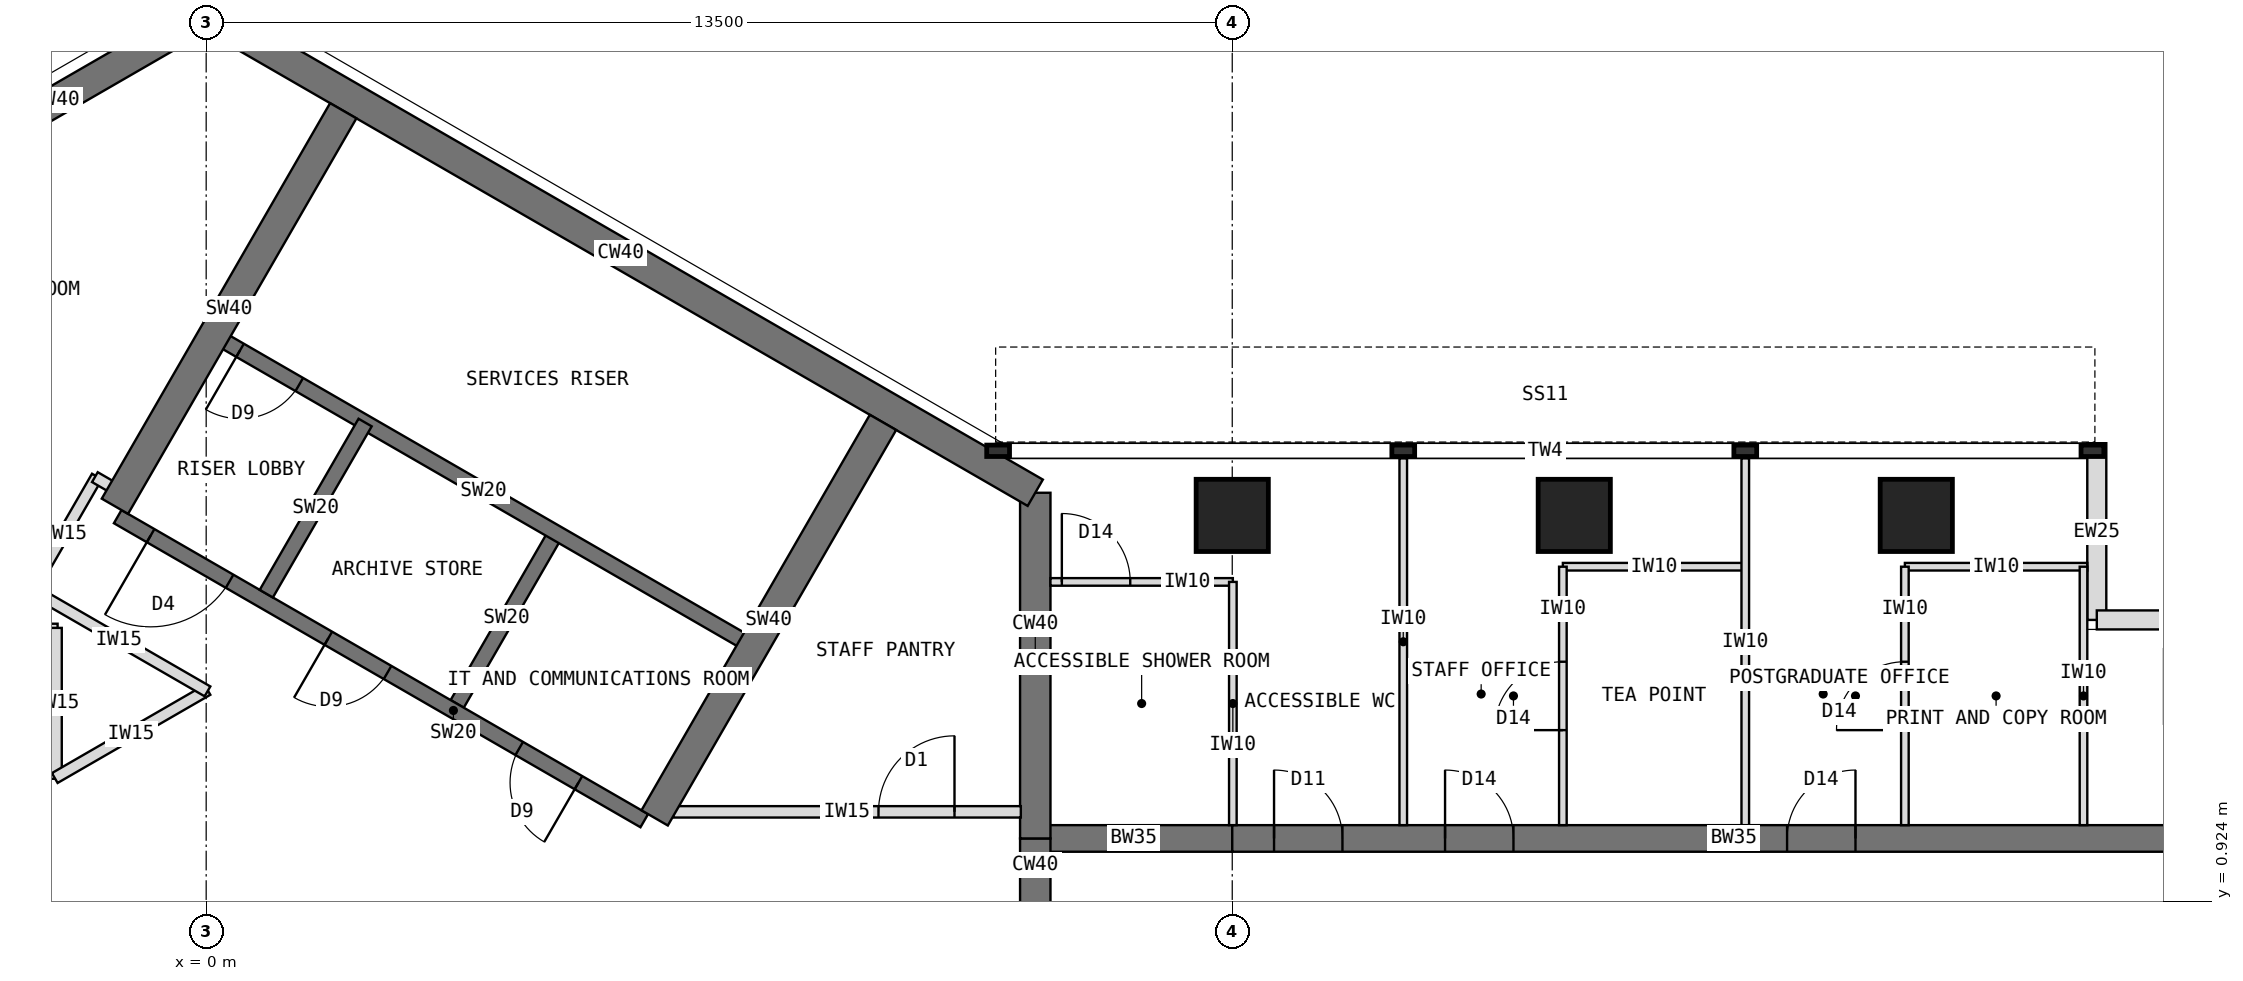
"""IFC4 building model, lengths in metres.
Left out: names, types, materials, properties, quantities, classifications, styles, units other than length and angle.
Written with IfcOpenShell. Run it as: python <this file> out.ifc"""

import sys

from ifc_helpers import new_model, si_unit, direction, frame, frame_2d, origin, origin_2d, place, context, subcontext, project, spatial, rectangle, extrude, element, fill, save


model = new_model("IFC4")
c1 = context("Model", 3, precision=1e-05, world=origin(), true_north=direction((0.0, 1.0)))
c2 = subcontext(c1, "Body", "Model", "MODEL_VIEW")
j1 = project(units=[si_unit("LENGTHUNIT", "METRE"), si_unit("PLANEANGLEUNIT", "RADIAN")], contexts=[c1])
p1 = place(None, origin())
s1 = spatial("IfcSite", under=j1, at=p1, CompositionType="ELEMENT")
p2 = place(p1, origin())
s2 = spatial("IfcBuilding", under=s1, at=p2, CompositionType="ELEMENT")
p3 = place(p2, frame((0.0, 0.0, 287.5)))
s3 = spatial("IfcBuildingStorey", under=s2, at=p3, CompositionType="ELEMENT", Elevation=287.5)
p4 = place(p3, frame((10.908, -1.75, 0.0), z_axis=(0.0, 0.0, 1.0), x_axis=(0.0, 1.0, 0.0)))
e1 = element("IfcWall", 1, at=p4, inside=s3, PredefinedType="SHEAR", context=c2, shape_type="SweptSolid", body=[
    extrude(rectangle(XDim=3.5, YDim=0.4, at=frame_2d((1.75, 0.0))), origin(), (0.0, 0.0, 1.0), 4.0),
])
p5 = place(p4, frame((0.85, 0.0, 0.0)))
e2 = element("IfcOpeningElement", 2, at=p5, cuts=e1, PredefinedType="OPENING", context=c2, shape_type="SweptSolid", body=[
    extrude(rectangle(XDim=1.8, YDim=2.1, at=frame_2d((0.9, 1.05))), frame((0.0, 0.21, 0.0), z_axis=(0.0, -1.0, 0.0), x_axis=(1.0, 0.0, 0.0)), (0.0, 0.0, 1.0), 0.42),
])
p6 = place(p3, frame((10.908, 1.75, 0.0), z_axis=(0.0, 0.0, 1.0), x_axis=(0.0, 1.0, 0.0)))
e3 = element("IfcWall", 3, at=p6, inside=s3, PredefinedType="SHEAR", context=c2, shape_type="SweptSolid", body=[
    extrude(rectangle(XDim=4.548, YDim=0.4, at=frame_2d((2.274, 0.0))), origin(), (0.0, 0.0, 1.0), 4.0),
])
p7 = place(p3, frame((10.908, 6.298, 0.0), z_axis=(0.0, 0.0, 1.0), x_axis=(-0.866021940709, 0.500005998175, 0.0)))
e4 = element("IfcWall", 4, at=p7, inside=s3, PredefinedType="SHEAR", context=c2, shape_type="SweptSolid", body=[
    extrude(rectangle(XDim=12.596, YDim=0.4, at=frame_2d((6.298, 0.0))), origin(), (0.0, 0.0, 1.0), 4.0),
])
p8 = place(p3, frame((0.0, 12.596, 0.0), z_axis=(0.0, 0.0, 1.0), x_axis=(-0.866011268655, -0.500024481964, 0.0)))
e5 = element("IfcWall", 5, at=p8, inside=s3, PredefinedType="SHEAR", context=c2, shape_type="SweptSolid", body=[
    extrude(rectangle(XDim=4.548, YDim=0.4, at=frame_2d((2.274, 0.0))), origin(), (0.0, 0.0, 1.0), 4.0),
])
p9 = place(p3, frame((10.908, 1.75, 0.0), z_axis=(0.0, 0.0, 1.0), x_axis=(1.0, 0.0, 0.0)))
e6 = element("IfcWall", 6, at=p9, inside=s3, PredefinedType="SHEAR", context=c2, shape_type="SweptSolid", body=[
    extrude(rectangle(XDim=2.592, YDim=0.35, at=frame_2d((1.296, 0.0))), origin(), (0.0, 0.0, 1.0), 4.0),
])
p10 = place(p3, frame((13.5, 1.75, 0.0), z_axis=(0.0, 0.0, 1.0), x_axis=(1.0, 0.0, 0.0)))
e7 = element("IfcWall", 7, at=p10, inside=s3, PredefinedType="SHEAR", context=c2, shape_type="SweptSolid", body=[
    extrude(rectangle(XDim=13.2, YDim=0.35, at=frame_2d((6.6, 0.0))), origin(), (0.0, 0.0, 1.0), 4.0),
])
p11 = place(p10, frame((0.55, 0.0, 0.0)))
e8 = element("IfcOpeningElement", 8, at=p11, cuts=e7, PredefinedType="OPENING", context=c2, shape_type="SweptSolid", body=[
    extrude(rectangle(XDim=0.9, YDim=2.1, at=frame_2d((0.45, 1.05))), frame((0.0, 0.185, 0.0), z_axis=(0.0, -1.0, 0.0), x_axis=(1.0, 0.0, 0.0)), (0.0, 0.0, 1.0), 0.37),
])
p12 = place(p10, frame((2.8, 0.0, 0.0)))
e9 = element("IfcOpeningElement", 9, at=p12, cuts=e7, PredefinedType="OPENING", context=c2, shape_type="SweptSolid", body=[
    extrude(rectangle(XDim=0.9, YDim=2.1, at=frame_2d((0.45, 1.05))), frame((0.0, 0.185, 0.0), z_axis=(0.0, -1.0, 0.0), x_axis=(1.0, 0.0, 0.0)), (0.0, 0.0, 1.0), 0.37),
])
p13 = place(p10, frame((7.3, 0.0, 0.0)))
e10 = element("IfcOpeningElement", 10, at=p13, cuts=e7, PredefinedType="OPENING", context=c2, shape_type="SweptSolid", body=[
    extrude(rectangle(XDim=0.9, YDim=2.1, at=frame_2d((0.45, 1.05))), frame((0.0, 0.185, 0.0), z_axis=(0.0, -1.0, 0.0), x_axis=(1.0, 0.0, 0.0)), (0.0, 0.0, 1.0), 0.37),
])
for number, where, z_axis, x_axis in (
    (11, (13.5, 6.0, 0.0), (0.0, 0.0, 1.0), (1.0, 0.0, 0.0)),
    (12, (18.0, 6.0, 0.0), (0.0, 0.0, 1.0), (1.0, 0.0, 0.0)),
    (13, (22.5, 6.0, 0.0), (0.0, 0.0, 1.0), (1.0, 0.0, 0.0)),
):
    element("IfcColumn", number, at=place(p3, frame(where, z_axis=z_axis, x_axis=x_axis)), inside=s3, PredefinedType="COLUMN", context=c2, shape_type="SweptSolid", body=[
        extrude(rectangle(XDim=0.95, YDim=0.95, at=origin_2d()), origin(), (0.0, 0.0, 1.0), 4.0),
    ])
for number, where, z_axis, x_axis in (
    (14, (24.875, 6.95, 0.0), (0.0, 0.0, 1.0), (0.0, -1.0, 0.0)),
    (15, (24.875, 4.625, 0.0), (0.0, 0.0, 1.0), (1.0, 0.0, 0.0)),
):
    element("IfcWall", number, at=place(p3, frame(where, z_axis=z_axis, x_axis=x_axis)), inside=s3, PredefinedType="STANDARD", context=c2, shape_type="SweptSolid", body=[
        extrude(rectangle(XDim=2.325, YDim=0.25, at=frame_2d((1.163, 0.0))), origin(), (0.0, 0.0, 1.0), 3.7),
    ])
p14 = place(p3, frame((5.764, 1.984, 0.0), z_axis=(0.0, 0.0, 1.0), x_axis=(-0.866026010844, 0.49999894854, 0.0)))
e16 = element("IfcWall", 16, at=p14, inside=s3, PredefinedType="SHEAR", context=c2, shape_type="SweptSolid", body=[
    extrude(rectangle(XDim=8.0, YDim=0.2, at=frame_2d((4.0, 0.0))), origin(), (0.0, 0.0, 1.0), 4.0),
])
p15 = place(p14, frame((6.3, 0.0, 0.0)))
e17 = element("IfcOpeningElement", 17, at=p15, cuts=e16, PredefinedType="OPENING", context=c2, shape_type="SweptSolid", body=[
    extrude(rectangle(XDim=1.2, YDim=2.1, at=frame_2d((0.6, 1.05))), frame((0.0, 0.11, 0.0), z_axis=(0.0, -1.0, 0.0), x_axis=(1.0, 0.0, 0.0)), (0.0, 0.0, 1.0), 0.22),
])
p16 = place(p14, frame((1.0, 0.0, 0.0)))
e18 = element("IfcOpeningElement", 18, at=p16, cuts=e16, PredefinedType="OPENING", context=c2, shape_type="SweptSolid", body=[
    extrude(rectangle(XDim=0.9, YDim=2.1, at=frame_2d((0.45, 1.05))), frame((0.0, 0.11, 0.0), z_axis=(0.0, -1.0, 0.0), x_axis=(1.0, 0.0, 0.0)), (0.0, 0.0, 1.0), 0.22),
])
p17 = place(p14, frame((3.9, 0.0, 0.0)))
e19 = element("IfcOpeningElement", 19, at=p17, cuts=e16, PredefinedType="OPENING", context=c2, shape_type="SweptSolid", body=[
    extrude(rectangle(XDim=0.9, YDim=2.1, at=frame_2d((0.45, 1.05))), frame((0.0, 0.11, 0.0), z_axis=(0.0, -1.0, 0.0), x_axis=(1.0, 0.0, 0.0)), (0.0, 0.0, 1.0), 0.22),
])
for number, where, z_axis, x_axis in (
    (20, (3.303, 3.52, 0.0), (0.0, 0.0, 1.0), (0.5, 0.866, 0.0)),
    (21, (0.791, 4.97, 0.0), (0.0, 0.0, 1.0), (0.5, 0.866, 0.0)),
):
    element("IfcWall", number, at=place(p3, frame(where, z_axis=z_axis, x_axis=x_axis)), inside=s3, PredefinedType="SHEAR", context=c2, shape_type="SweptSolid", body=[
        extrude(rectangle(XDim=2.6, YDim=0.2, at=frame_2d((1.3, 0.0))), origin(), (0.0, 0.0, 1.0), 4.0),
    ])
p18 = place(p3, frame((7.114, 4.322, 0.0), z_axis=(0.0, 0.0, 1.0), x_axis=(-0.866026010844, 0.49999894854, 0.0)))
e22 = element("IfcWall", 22, at=p18, inside=s3, PredefinedType="SHEAR", context=c2, shape_type="SweptSolid", body=[
    extrude(rectangle(XDim=8.0, YDim=0.2, at=frame_2d((4.0, 0.0))), origin(), (0.0, 0.0, 1.0), 4.0),
])
p19 = place(p18, frame((6.8, 0.0, 0.0)))
e23 = element("IfcOpeningElement", 23, at=p19, cuts=e22, PredefinedType="OPENING", context=c2, shape_type="SweptSolid", body=[
    extrude(rectangle(XDim=0.9, YDim=2.1, at=frame_2d((0.45, 1.05))), frame((0.0, 0.11, 0.0), z_axis=(0.0, -1.0, 0.0), x_axis=(1.0, 0.0, 0.0)), (0.0, 0.0, 1.0), 0.22),
])
for number, where, z_axis, x_axis in (
    (24, (-1.201, 6.12, 0.0), (0.0, 0.0, 1.0), (0.5, 0.866, 0.0)),
    (25, (5.901, 2.02, 0.0), (0.0, 0.0, 1.0), (0.5, 0.866, 0.0)),
):
    element("IfcWall", number, at=place(p3, frame(where, z_axis=z_axis, x_axis=x_axis)), inside=s3, PredefinedType="SHEAR", context=c2, shape_type="SweptSolid", body=[
        extrude(rectangle(XDim=6.008, YDim=0.4, at=frame_2d((3.004, 0.0))), origin(), (0.0, 0.0, 1.0), 4.0),
    ])
for number, where, z_axis, x_axis in (
    (26, (15.75, 1.925, 0.0), (0.0, 0.0, 1.0), (0.0, 1.0, 0.0)),
    (27, (20.25, 1.925, 0.0), (0.0, 0.0, 1.0), (0.0, 1.0, 0.0)),
):
    element("IfcWall", number, at=place(p3, frame(where, z_axis=z_axis, x_axis=x_axis)), inside=s3, PredefinedType="PARTITIONING", context=c2, shape_type="SweptSolid", body=[
        extrude(rectangle(XDim=4.825, YDim=0.1, at=frame_2d((2.413, 0.0))), origin(), (0.0, 0.0, 1.0), 3.7),
    ])
p20 = place(p3, frame((17.85, 5.325, 0.0), z_axis=(0.0, 0.0, 1.0), x_axis=(1.0, 0.0, 0.0)))
e28 = element("IfcWall", 28, at=p20, inside=s3, PredefinedType="PARTITIONING", context=c2, shape_type="SweptSolid", body=[
    extrude(rectangle(XDim=2.4, YDim=0.1, at=frame_2d((1.2, 0.0))), origin(), (0.0, 0.0, 1.0), 3.7),
])
p21 = place(p3, frame((17.85, 1.925, 0.0), z_axis=(0.0, 0.0, 1.0), x_axis=(0.0, 1.0, 0.0)))
e29 = element("IfcWall", 29, at=p21, inside=s3, PredefinedType="PARTITIONING", context=c2, shape_type="SweptSolid", body=[
    extrude(rectangle(XDim=3.4, YDim=0.1, at=frame_2d((1.7, 0.0))), origin(), (0.0, 0.0, 1.0), 3.7),
])
p22 = place(p21, frame((1.25, 0.0, 0.0)))
e30 = element("IfcOpeningElement", 30, at=p22, cuts=e29, PredefinedType="OPENING", context=c2, shape_type="SweptSolid", body=[
    extrude(rectangle(XDim=0.9, YDim=2.1, at=frame_2d((0.45, 1.05))), frame((0.0, 0.06, 0.0), z_axis=(0.0, -1.0, 0.0), x_axis=(1.0, 0.0, 0.0)), (0.0, 0.0, 1.0), 0.12),
])
p23 = place(p3, frame((22.35, 5.325, 0.0), z_axis=(0.0, 0.0, 1.0), x_axis=(1.0, 0.0, 0.0)))
e31 = element("IfcWall", 31, at=p23, inside=s3, PredefinedType="PARTITIONING", context=c2, shape_type="SweptSolid", body=[
    extrude(rectangle(XDim=2.4, YDim=0.1, at=frame_2d((1.2, 0.0))), origin(), (0.0, 0.0, 1.0), 3.7),
])
p24 = place(p3, frame((22.35, 1.925, 0.0), z_axis=(0.0, 0.0, 1.0), x_axis=(0.0, 1.0, 0.0)))
e32 = element("IfcWall", 32, at=p24, inside=s3, PredefinedType="PARTITIONING", context=c2, shape_type="SweptSolid", body=[
    extrude(rectangle(XDim=3.4, YDim=0.1, at=frame_2d((1.7, 0.0))), origin(), (0.0, 0.0, 1.0), 3.7),
])
p25 = place(p24, frame((1.25, 0.0, 0.0)))
e33 = element("IfcOpeningElement", 33, at=p25, cuts=e32, PredefinedType="OPENING", context=c2, shape_type="SweptSolid", body=[
    extrude(rectangle(XDim=0.9, YDim=2.1, at=frame_2d((0.45, 1.05))), frame((0.0, 0.06, 0.0), z_axis=(0.0, -1.0, 0.0), x_axis=(1.0, 0.0, 0.0)), (0.0, 0.0, 1.0), 0.12),
])
p26 = place(p3, frame((24.7, 1.925, 0.0), z_axis=(0.0, 0.0, 1.0), x_axis=(0.0, 1.0, 0.0)))
e34 = element("IfcWall", 34, at=p26, inside=s3, PredefinedType="PARTITIONING", context=c2, shape_type="SweptSolid", body=[
    extrude(rectangle(XDim=3.4, YDim=0.1, at=frame_2d((1.7, 0.0))), origin(), (0.0, 0.0, 1.0), 3.7),
])
p27 = place(p3, frame((11.108, 5.125, 0.0), z_axis=(0.0, 0.0, 1.0), x_axis=(1.0, 0.0, 0.0)))
e35 = element("IfcWall", 35, at=p27, inside=s3, PredefinedType="PARTITIONING", context=c2, shape_type="SweptSolid", body=[
    extrude(rectangle(XDim=2.4, YDim=0.1, at=frame_2d((1.2, 0.0))), origin(), (0.0, 0.0, 1.0), 3.7),
])
p28 = place(p27, frame((0.15, 0.0, 0.0)))
e36 = element("IfcOpeningElement", 36, at=p28, cuts=e35, PredefinedType="OPENING", context=c2, shape_type="SweptSolid", body=[
    extrude(rectangle(XDim=0.9, YDim=2.1, at=frame_2d((0.45, 1.05))), frame((0.0, 0.06, 0.0), z_axis=(0.0, -1.0, 0.0), x_axis=(1.0, 0.0, 0.0)), (0.0, 0.0, 1.0), 0.12),
])
p29 = place(p3, frame((13.508, 1.925, 0.0), z_axis=(0.0, 0.0, 1.0), x_axis=(0.0, 1.0, 0.0)))
e37 = element("IfcWall", 37, at=p29, inside=s3, PredefinedType="PARTITIONING", context=c2, shape_type="SweptSolid", body=[
    extrude(rectangle(XDim=3.2, YDim=0.1, at=frame_2d((1.6, 0.0))), origin(), (0.0, 0.0, 1.0), 3.167),
])
p30 = place(p3, frame((-4.92, 4.5, 0.0), z_axis=(0.0, 0.0, 1.0), x_axis=(1.0, 0.0, 0.0)))
e38 = element("IfcWall", 38, at=p30, inside=s3, PredefinedType="PARTITIONING", context=c2, shape_type="SweptSolid", body=[
    extrude(rectangle(XDim=2.965, YDim=0.15, at=frame_2d((1.482, 0.0))), origin(), (0.0, 0.0, 1.0), 3.7),
])
p31 = place(p30, frame((0.8, 0.0, 0.0)))
e39 = element("IfcOpeningElement", 39, at=p31, cuts=e38, PredefinedType="OPENING", context=c2, shape_type="SweptSolid", body=[
    extrude(rectangle(XDim=1.0, YDim=2.1, at=frame_2d((0.5, 1.05))), frame((0.0, 0.085, 0.0), z_axis=(0.0, -1.0, 0.0), x_axis=(1.0, 0.0, 0.0)), (0.0, 0.0, 1.0), 0.17),
])
p32 = place(p3, frame((-1.975, 4.52, 0.0), z_axis=(0.0, 0.0, 1.0), x_axis=(0.0, -1.0, 0.0)))
e40 = element("IfcWall", 40, at=p32, inside=s3, PredefinedType="PARTITIONING", context=c2, shape_type="SweptSolid", body=[
    extrude(rectangle(XDim=1.985, YDim=0.15, at=frame_2d((0.993, 0.0))), origin(), (0.0, 0.0, 1.0), 3.7),
])
p33 = place(p3, frame((-1.992, 2.545, 0.0), z_axis=(0.0, 0.0, 1.0), x_axis=(0.866059450854, 0.499941024108, 0.0)))
e41 = element("IfcWall", 41, at=p33, inside=s3, PredefinedType="PARTITIONING", context=c2, shape_type="SweptSolid", body=[
    extrude(rectangle(XDim=2.321, YDim=0.15, at=frame_2d((1.16, 0.0))), origin(), (0.0, 0.0, 1.0), 3.7),
])
p34 = place(p3, frame((0.017, 3.685, 0.0), z_axis=(0.0, 0.0, 1.0), x_axis=(-0.866036099759, 0.499981473571, 0.0)))
e42 = element("IfcWall", 42, at=p34, inside=s3, PredefinedType="PARTITIONING", context=c2, shape_type="SweptSolid", body=[
    extrude(rectangle(XDim=2.692, YDim=0.15, at=frame_2d((1.346, 0.0))), origin(), (0.0, 0.0, 1.0), 3.7),
])
p35 = place(p3, frame((-2.307, 5.004, 0.0), z_axis=(0.0, 0.0, 1.0), x_axis=(0.500062521093, 0.865989304205, 0.0)))
e43 = element("IfcWall", 43, at=p35, inside=s3, PredefinedType="PARTITIONING", context=c2, shape_type="SweptSolid", body=[
    extrude(rectangle(XDim=1.74, YDim=0.15, at=frame_2d((0.87, 0.0))), origin(), (0.0, 0.0, 1.0), 3.7),
])
p36 = place(p3, frame((-1.464, 6.503, 0.0), z_axis=(0.0, 0.0, 1.0), x_axis=(0.866138304741, -0.499804398801, 0.0)))
e44 = element("IfcWall", 44, at=p36, inside=s3, PredefinedType="PARTITIONING", context=c2, shape_type="SweptSolid", body=[
    extrude(rectangle(XDim=0.43, YDim=0.15, at=frame_2d((0.215, 0.0))), origin(), (0.0, 0.0, 1.0), 3.7),
])
p37 = place(p3, frame((6.143, 2.1, 0.0), z_axis=(0.0, 0.0, 1.0), x_axis=(1.0, 0.0, 0.0)))
e45 = element("IfcWall", 45, at=p37, inside=s3, PredefinedType="PARTITIONING", context=c2, shape_type="SweptSolid", body=[
    extrude(rectangle(XDim=4.576, YDim=0.15, at=frame_2d((2.288, 0.0))), origin(), (0.0, 0.0, 1.0), 3.7),
])
p38 = place(p37, frame((2.703, 0.0, 0.0)))
e46 = element("IfcOpeningElement", 46, at=p38, cuts=e45, PredefinedType="OPENING", context=c2, shape_type="SweptSolid", body=[
    extrude(rectangle(XDim=1.0, YDim=2.1, at=frame_2d((0.5, 1.05))), frame((0.0, 0.085, 0.0), z_axis=(0.0, -1.0, 0.0), x_axis=(1.0, 0.0, 0.0)), (0.0, 0.0, 1.0), 0.17),
])
p39 = place(p15, origin())
e47 = element("IfcDoor", 47, at=p39, inside=s3, OperationType="SINGLE_SWING_RIGHT", PredefinedType="DOOR", context=c2, shape_type="SweptSolid", body=[
    extrude(rectangle(XDim=1.2, YDim=2.1, at=frame_2d((0.6, 1.05))), frame((0.0, 0.025, 0.0), z_axis=(0.0, -1.0, 0.0), x_axis=(1.0, 0.0, 0.0)), (0.0, 0.0, 1.0), 0.05),
])
fill(e17, e47)
p40 = place(p19, origin())
e48 = element("IfcDoor", 48, at=p40, inside=s3, OperationType="SINGLE_SWING_RIGHT", PredefinedType="DOOR", context=c2, shape_type="SweptSolid", body=[
    extrude(rectangle(XDim=0.9, YDim=2.1, at=frame_2d((0.45, 1.05))), frame((0.0, 0.025, 0.0), z_axis=(0.0, -1.0, 0.0), x_axis=(1.0, 0.0, 0.0)), (0.0, 0.0, 1.0), 0.05),
])
fill(e23, e48)
p41 = place(p22, origin())
e49 = element("IfcDoor", 49, at=p41, inside=s3, OperationType="SINGLE_SWING_LEFT", PredefinedType="DOOR", context=c2, shape_type="SweptSolid", body=[
    extrude(rectangle(XDim=0.9, YDim=2.1, at=frame_2d((0.45, 1.05))), frame((0.0, 0.025, 0.0), z_axis=(0.0, -1.0, 0.0), x_axis=(1.0, 0.0, 0.0)), (0.0, 0.0, 1.0), 0.05),
])
fill(e30, e49)
p42 = place(p25, origin())
e50 = element("IfcDoor", 50, at=p42, inside=s3, OperationType="SINGLE_SWING_LEFT", PredefinedType="DOOR", context=c2, shape_type="SweptSolid", body=[
    extrude(rectangle(XDim=0.9, YDim=2.1, at=frame_2d((0.45, 1.05))), frame((0.0, 0.025, 0.0), z_axis=(0.0, -1.0, 0.0), x_axis=(1.0, 0.0, 0.0)), (0.0, 0.0, 1.0), 0.05),
])
fill(e33, e50)
p43 = place(p28, origin())
e51 = element("IfcDoor", 51, at=p43, inside=s3, OperationType="SINGLE_SWING_LEFT", PredefinedType="DOOR", context=c2, shape_type="SweptSolid", body=[
    extrude(rectangle(XDim=0.9, YDim=2.1, at=frame_2d((0.45, 1.05))), frame((0.0, 0.025, 0.0), z_axis=(0.0, -1.0, 0.0), x_axis=(1.0, 0.0, 0.0)), (0.0, 0.0, 1.0), 0.05),
])
fill(e36, e51)
p44 = place(p38, origin())
e52 = element("IfcDoor", 52, at=p44, inside=s3, OperationType="SINGLE_SWING_RIGHT", PredefinedType="DOOR", context=c2, shape_type="SweptSolid", body=[
    extrude(rectangle(XDim=1.0, YDim=2.1, at=frame_2d((0.5, 1.05))), frame((0.0, 0.025, 0.0), z_axis=(0.0, -1.0, 0.0), x_axis=(1.0, 0.0, 0.0)), (0.0, 0.0, 1.0), 0.05),
])
fill(e46, e52)
p45 = place(p11, origin())
e53 = element("IfcDoor", 53, at=p45, inside=s3, OperationType="SINGLE_SWING_LEFT", PredefinedType="DOOR", context=c2, shape_type="SweptSolid", body=[
    extrude(rectangle(XDim=0.9, YDim=2.1, at=frame_2d((0.45, 1.05))), frame((0.0, 0.025, 0.0), z_axis=(0.0, -1.0, 0.0), x_axis=(1.0, 0.0, 0.0)), (0.0, 0.0, 1.0), 0.05),
])
fill(e8, e53)
p46 = place(p12, origin())
e54 = element("IfcDoor", 54, at=p46, inside=s3, OperationType="SINGLE_SWING_LEFT", PredefinedType="DOOR", context=c2, shape_type="SweptSolid", body=[
    extrude(rectangle(XDim=0.9, YDim=2.1, at=frame_2d((0.45, 1.05))), frame((0.0, 0.025, 0.0), z_axis=(0.0, -1.0, 0.0), x_axis=(1.0, 0.0, 0.0)), (0.0, 0.0, 1.0), 0.05),
])
fill(e9, e54)
p47 = place(p13, origin())
e55 = element("IfcDoor", 55, at=p47, inside=s3, OperationType="SINGLE_SWING_RIGHT", PredefinedType="DOOR", context=c2, shape_type="SweptSolid", body=[
    extrude(rectangle(XDim=0.9, YDim=2.1, at=frame_2d((0.45, 1.05))), frame((0.0, 0.025, 0.0), z_axis=(0.0, -1.0, 0.0), x_axis=(1.0, 0.0, 0.0)), (0.0, 0.0, 1.0), 0.05),
])
fill(e10, e55)
p48 = place(p16, origin())
e56 = element("IfcDoor", 56, at=p48, inside=s3, OperationType="SINGLE_SWING_LEFT", PredefinedType="DOOR", context=c2, shape_type="SweptSolid", body=[
    extrude(rectangle(XDim=0.9, YDim=2.1, at=frame_2d((0.45, 1.05))), frame((0.0, 0.025, 0.0), z_axis=(0.0, -1.0, 0.0), x_axis=(1.0, 0.0, 0.0)), (0.0, 0.0, 1.0), 0.05),
])
fill(e18, e56)
p49 = place(p17, origin())
e57 = element("IfcDoor", 57, at=p49, inside=s3, OperationType="SINGLE_SWING_RIGHT", PredefinedType="DOOR", context=c2, shape_type="SweptSolid", body=[
    extrude(rectangle(XDim=0.9, YDim=2.1, at=frame_2d((0.45, 1.05))), frame((0.0, 0.025, 0.0), z_axis=(0.0, -1.0, 0.0), x_axis=(1.0, 0.0, 0.0)), (0.0, 0.0, 1.0), 0.05),
])
fill(e19, e57)
save(model, sys.argv[1])
